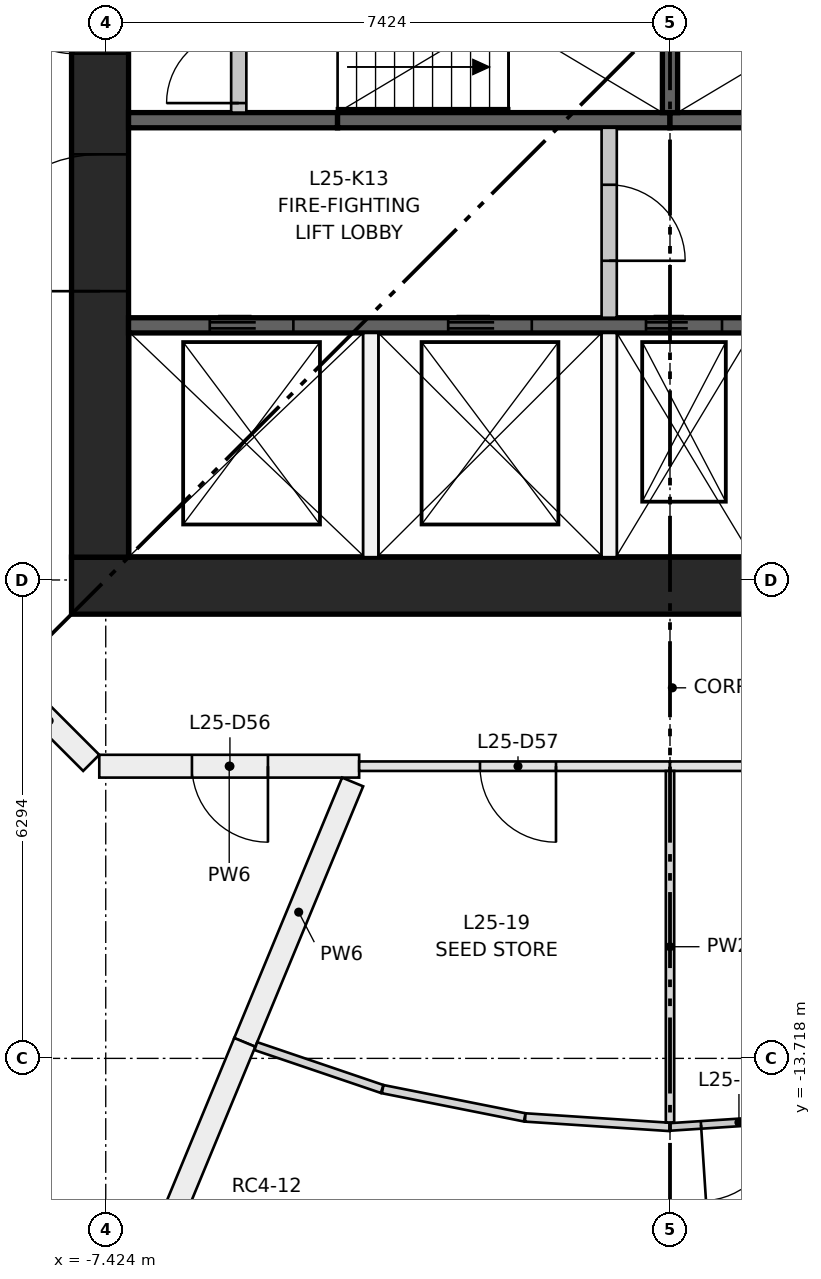
"""IFC4 building model, lengths in metres.
Left out: names, types, materials, properties, quantities, classifications, styles, units other than length and angle.
Written with IfcOpenShell. Run it as: python <this file> out.ifc"""

import sys

from ifc_helpers import new_model, si_unit, direction, frame, frame_2d, origin, place, context, subcontext, project, spatial, rectangle, extrude, element, fill, save


model = new_model("IFC4")
c1 = context("Model", 3, precision=1e-05, world=origin(), true_north=direction((0.0, 1.0)))
c2 = subcontext(c1, "Body", "Model", "MODEL_VIEW")
j1 = project(units=[si_unit("LENGTHUNIT", "METRE"), si_unit("PLANEANGLEUNIT", "RADIAN")], contexts=[c1])
p1 = place(None, origin())
s1 = spatial("IfcSite", under=j1, at=p1, CompositionType="ELEMENT")
p2 = place(p1, origin())
s2 = spatial("IfcBuilding", under=s1, at=p2, CompositionType="ELEMENT")
p3 = place(p2, frame((0.0, 0.0, 98.3)))
s3 = spatial("IfcBuildingStorey", under=s2, at=p3, CompositionType="ELEMENT", Elevation=98.3)
p4 = place(p3, frame((-7.874, -7.499, 0.0), z_axis=(0.0, 0.0, 1.0), x_axis=(1.0, 0.0, 0.0)))
e1 = element("IfcWall", 1, at=p4, inside=s3, PredefinedType="SHEAR", context=c2, shape_type="SweptSolid", body=[
    extrude(rectangle(XDim=15.748, YDim=0.75, at=frame_2d((7.874, 0.0))), origin(), (0.0, 0.0, 1.0), 3.65),
])
p5 = place(p3, frame((-7.499, -7.124, 0.0), z_axis=(0.0, 0.0, 1.0), x_axis=(0.0, 1.0, 0.0)))
e2 = element("IfcWall", 2, at=p5, inside=s3, PredefinedType="SHEAR", context=c2, shape_type="SweptSolid", body=[
    extrude(rectangle(XDim=14.248, YDim=0.75, at=frame_2d((7.124, 0.0))), origin(), (0.0, 0.0, 1.0), 3.65),
])
p6 = place(p5, frame((6.624, 0.0, 0.0)))
e3 = element("IfcOpeningElement", 3, at=p6, cuts=e2, PredefinedType="OPENING", context=c2, shape_type="SweptSolid", body=[
    extrude(rectangle(XDim=1.0, YDim=2.1, at=frame_2d((0.5, 1.05))), frame((0.0, 0.385, 0.0), z_axis=(0.0, -1.0, 0.0), x_axis=(1.0, 0.0, 0.0)), (0.0, 0.0, 1.0), 0.77),
])
p7 = place(p5, frame((3.5, 0.0, 0.0)))
e4 = element("IfcOpeningElement", 4, at=p7, cuts=e2, PredefinedType="OPENING", context=c2, shape_type="SweptSolid", body=[
    extrude(rectangle(XDim=1.8, YDim=2.1, at=frame_2d((0.9, 1.05))), frame((0.0, 0.385, 0.0), z_axis=(0.0, -1.0, 0.0), x_axis=(1.0, 0.0, 0.0)), (0.0, 0.0, 1.0), 0.77),
])
p8 = place(p5, frame((8.948, 0.0, 0.0)))
e5 = element("IfcOpeningElement", 5, at=p8, cuts=e2, PredefinedType="OPENING", context=c2, shape_type="SweptSolid", body=[
    extrude(rectangle(XDim=1.8, YDim=2.1, at=frame_2d((0.9, 1.05))), frame((0.0, 0.385, 0.0), z_axis=(0.0, -1.0, 0.0), x_axis=(1.0, 0.0, 0.0)), (0.0, 0.0, 1.0), 0.77),
])
p9 = place(p5, frame((12.124, 0.0, 0.0)))
e6 = element("IfcOpeningElement", 6, at=p9, cuts=e2, PredefinedType="OPENING", context=c2, shape_type="SweptSolid", body=[
    extrude(rectangle(XDim=1.0, YDim=2.1, at=frame_2d((0.5, 1.05))), frame((0.0, 0.385, 0.0), z_axis=(0.0, -1.0, 0.0), x_axis=(1.0, 0.0, 0.0)), (0.0, 0.0, 1.0), 0.77),
])
p10 = place(p3, frame((-7.124, -4.074, 0.0), z_axis=(0.0, 0.0, 1.0), x_axis=(1.0, 0.0, 0.0)))
e7 = element("IfcWall", 7, at=p10, inside=s3, PredefinedType="SHEAR", context=c2, shape_type="SweptSolid", body=[
    extrude(rectangle(XDim=14.248, YDim=0.2, at=frame_2d((7.124, 0.0))), origin(), (0.0, 0.0, 1.0), 3.3),
])
p11 = place(p10, frame((1.069, 0.0, 0.0)))
e8 = element("IfcOpeningElement", 8, at=p11, cuts=e7, PredefinedType="OPENING", context=c2, shape_type="SweptSolid", body=[
    extrude(rectangle(XDim=1.1, YDim=2.1, at=frame_2d((0.55, 1.05))), frame((0.0, 0.11, 0.0), z_axis=(0.0, -1.0, 0.0), x_axis=(1.0, 0.0, 0.0)), (0.0, 0.0, 1.0), 0.22),
])
p12 = place(p10, frame((4.206, 0.0, 0.0)))
e9 = element("IfcOpeningElement", 9, at=p12, cuts=e7, PredefinedType="OPENING", context=c2, shape_type="SweptSolid", body=[
    extrude(rectangle(XDim=1.1, YDim=2.1, at=frame_2d((0.55, 1.05))), frame((0.0, 0.11, 0.0), z_axis=(0.0, -1.0, 0.0), x_axis=(1.0, 0.0, 0.0)), (0.0, 0.0, 1.0), 0.22),
])
p13 = place(p10, frame((6.808, 0.0, 0.0)))
e10 = element("IfcOpeningElement", 10, at=p13, cuts=e7, PredefinedType="OPENING", context=c2, shape_type="SweptSolid", body=[
    extrude(rectangle(XDim=1.0, YDim=2.1, at=frame_2d((0.5, 1.05))), frame((0.0, 0.11, 0.0), z_axis=(0.0, -1.0, 0.0), x_axis=(1.0, 0.0, 0.0)), (0.0, 0.0, 1.0), 0.22),
])
p14 = place(p10, frame((8.777, 0.0, 0.0)))
e11 = element("IfcOpeningElement", 11, at=p14, cuts=e7, PredefinedType="OPENING", context=c2, shape_type="SweptSolid", body=[
    extrude(rectangle(XDim=1.0, YDim=2.1, at=frame_2d((0.5, 1.05))), frame((0.0, 0.11, 0.0), z_axis=(0.0, -1.0, 0.0), x_axis=(1.0, 0.0, 0.0)), (0.0, 0.0, 1.0), 0.22),
])
p15 = place(p10, frame((10.745, 0.0, 0.0)))
e12 = element("IfcOpeningElement", 12, at=p15, cuts=e7, PredefinedType="OPENING", context=c2, shape_type="SweptSolid", body=[
    extrude(rectangle(XDim=1.0, YDim=2.1, at=frame_2d((0.5, 1.05))), frame((0.0, 0.11, 0.0), z_axis=(0.0, -1.0, 0.0), x_axis=(1.0, 0.0, 0.0)), (0.0, 0.0, 1.0), 0.22),
])
p16 = place(p10, frame((12.714, 0.0, 0.0)))
e13 = element("IfcOpeningElement", 13, at=p16, cuts=e7, PredefinedType="OPENING", context=c2, shape_type="SweptSolid", body=[
    extrude(rectangle(XDim=1.0, YDim=2.1, at=frame_2d((0.5, 1.05))), frame((0.0, 0.11, 0.0), z_axis=(0.0, -1.0, 0.0), x_axis=(1.0, 0.0, 0.0)), (0.0, 0.0, 1.0), 0.22),
])
p17 = place(p3, frame((-7.124, -1.375, 0.0), z_axis=(0.0, 0.0, 1.0), x_axis=(1.0, 0.0, 0.0)))
e14 = element("IfcWall", 14, at=p17, inside=s3, PredefinedType="SHEAR", context=c2, shape_type="SweptSolid", body=[
    extrude(rectangle(XDim=2.75, YDim=0.2, at=frame_2d((1.375, 0.0))), origin(), (0.0, 0.0, 1.0), 3.3),
])
for number, where, z_axis, x_axis in (
    (15, (-4.374, -1.375, 0.0), (0.0, 0.0, 1.0), (1.0, 0.0, 0.0)),
    (16, (0.0, -1.375, 0.0), (0.0, 0.0, 1.0), (1.0, 0.0, 0.0)),
):
    element("IfcWall", number, at=place(p3, frame(where, z_axis=z_axis, x_axis=x_axis)), inside=s3, PredefinedType="SHEAR", context=c2, shape_type="SweptSolid", body=[
        extrude(rectangle(XDim=4.374, YDim=0.2, at=frame_2d((2.187, 0.0))), origin(), (0.0, 0.0, 1.0), 3.3),
    ])
p18 = place(p3, frame((0.0, -1.275, 0.0), z_axis=(0.0, 0.0, 1.0), x_axis=(0.0, 1.0, 0.0)))
e17 = element("IfcWall", 17, at=p18, inside=s3, PredefinedType="SHEAR", context=c2, shape_type="SweptSolid", body=[
    extrude(rectangle(XDim=2.55, YDim=0.2, at=frame_2d((1.275, 0.0))), origin(), (0.0, 0.0, 1.0), 3.3),
])
for number, where, z_axis, x_axis in (
    (18, (-3.937, -7.124, 0.0), (0.0, 0.0, 1.0), (0.0, 1.0, 0.0)),
    (19, (-0.8, -7.124, 0.0), (0.0, 0.0, 1.0), (0.0, 1.0, 0.0)),
):
    element("IfcWall", number, at=place(p3, frame(where, z_axis=z_axis, x_axis=x_axis)), inside=s3, PredefinedType="PARTITIONING", context=c2, shape_type="SweptSolid", body=[
        extrude(rectangle(XDim=2.95, YDim=0.2, at=frame_2d((1.475, 0.0))), origin(), (0.0, 0.0, 1.0), 3.3),
    ])
p19 = place(p3, frame((-0.8, -3.974, 0.0), z_axis=(0.0, 0.0, 1.0), x_axis=(0.0, 1.0, 0.0)))
e20 = element("IfcWall", 20, at=p19, inside=s3, PredefinedType="PARTITIONING", context=c2, shape_type="SweptSolid", body=[
    extrude(rectangle(XDim=2.499, YDim=0.2, at=frame_2d((1.25, 0.0))), origin(), (0.0, 0.0, 1.0), 3.3),
])
p20 = place(p19, frame((0.75, 0.0, 0.0)))
e21 = element("IfcOpeningElement", 21, at=p20, cuts=e20, PredefinedType="OPENING", context=c2, shape_type="SweptSolid", body=[
    extrude(rectangle(XDim=1.0, YDim=2.1, at=frame_2d((0.5, 1.05))), frame((0.0, 0.11, 0.0), z_axis=(0.0, -1.0, 0.0), x_axis=(1.0, 0.0, 0.0)), (0.0, 0.0, 1.0), 0.22),
])
p21 = place(p3, frame((-5.674, -1.275, 0.0), z_axis=(0.0, 0.0, 1.0), x_axis=(0.0, 1.0, 0.0)))
e22 = element("IfcWall", 22, at=p21, inside=s3, PredefinedType="PARTITIONING", context=c2, shape_type="SweptSolid", body=[
    extrude(rectangle(XDim=2.55, YDim=0.2, at=frame_2d((1.275, 0.0))), origin(), (0.0, 0.0, 1.0), 3.3),
])
p22 = place(p21, frame((0.125, 0.0, 0.0)))
e23 = element("IfcOpeningElement", 23, at=p22, cuts=e22, PredefinedType="OPENING", context=c2, shape_type="SweptSolid", body=[
    extrude(rectangle(XDim=0.95, YDim=2.1, at=frame_2d((0.475, 1.05))), frame((0.0, 0.11, 0.0), z_axis=(0.0, -1.0, 0.0), x_axis=(1.0, 0.0, 0.0)), (0.0, 0.0, 1.0), 0.22),
])
p23 = place(p21, frame((1.475, 0.0, 0.0)))
e24 = element("IfcOpeningElement", 24, at=p23, cuts=e22, PredefinedType="OPENING", context=c2, shape_type="SweptSolid", body=[
    extrude(rectangle(XDim=0.95, YDim=2.1, at=frame_2d((0.475, 1.05))), frame((0.0, 0.11, 0.0), z_axis=(0.0, -1.0, 0.0), x_axis=(1.0, 0.0, 0.0)), (0.0, 0.0, 1.0), 0.22),
])
p24 = place(p3, frame((-7.615, -9.83, 0.0), z_axis=(0.0, 0.0, 1.0), x_axis=(-0.707028841614, 0.70718471217, 0.0)))
e25 = element("IfcWall", 25, at=p24, inside=s3, PredefinedType="PARTITIONING", context=c2, shape_type="SweptSolid", body=[
    extrude(rectangle(XDim=1.566, YDim=0.3, at=frame_2d((0.783, 0.0))), origin(), (0.0, 0.0, 1.0), 3.3),
])
p25 = place(p3, frame((-4.09, -9.874, 0.0), z_axis=(0.0, 0.0, 1.0), x_axis=(-1.0, 0.0, 0.0)))
e26 = element("IfcWall", 26, at=p25, inside=s3, PredefinedType="PARTITIONING", context=c2, shape_type="SweptSolid", body=[
    extrude(rectangle(XDim=3.419, YDim=0.3, at=frame_2d((1.709, 0.0))), origin(), (0.0, 0.0, 1.0), 3.3),
])
p26 = place(p25, frame((1.2, 0.0, 0.0)))
e27 = element("IfcOpeningElement", 27, at=p26, cuts=e26, PredefinedType="OPENING", context=c2, shape_type="SweptSolid", body=[
    extrude(rectangle(XDim=1.0, YDim=2.1, at=frame_2d((0.5, 1.05))), frame((0.0, 0.16, 0.0), z_axis=(0.0, -1.0, 0.0), x_axis=(1.0, 0.0, 0.0)), (0.0, 0.0, 1.0), 0.32),
])
p27 = place(p3, frame((0.0, -9.874, 0.0), z_axis=(0.0, 0.0, 1.0), x_axis=(-1.0, 0.0, 0.0)))
e28 = element("IfcWall", 28, at=p27, inside=s3, PredefinedType="PARTITIONING", context=c2, shape_type="SweptSolid", body=[
    extrude(rectangle(XDim=4.09, YDim=0.125, at=frame_2d((2.045, 0.0))), origin(), (0.0, 0.0, 1.0), 3.3),
])
p28 = place(p27, frame((1.5, 0.0, 0.0)))
e29 = element("IfcOpeningElement", 29, at=p28, cuts=e28, PredefinedType="OPENING", context=c2, shape_type="SweptSolid", body=[
    extrude(rectangle(XDim=1.0, YDim=2.1, at=frame_2d((0.5, 1.05))), frame((0.0, 0.073, 0.0), z_axis=(0.0, -1.0, 0.0), x_axis=(1.0, 0.0, 0.0)), (0.0, 0.0, 1.0), 0.145),
])
p29 = place(p3, frame((4.09, -9.874, 0.0), z_axis=(0.0, 0.0, 1.0), x_axis=(-1.0, 0.0, 0.0)))
e30 = element("IfcWall", 30, at=p29, inside=s3, PredefinedType="PARTITIONING", context=c2, shape_type="SweptSolid", body=[
    extrude(rectangle(XDim=4.09, YDim=0.125, at=frame_2d((2.045, 0.0))), origin(), (0.0, 0.0, 1.0), 3.3),
])
p30 = place(p29, frame((1.5, 0.0, 0.0)))
e31 = element("IfcOpeningElement", 31, at=p30, cuts=e30, PredefinedType="OPENING", context=c2, shape_type="SweptSolid", body=[
    extrude(rectangle(XDim=1.0, YDim=2.1, at=frame_2d((0.5, 1.05))), frame((0.0, 0.073, 0.0), z_axis=(0.0, -1.0, 0.0), x_axis=(1.0, 0.0, 0.0)), (0.0, 0.0, 1.0), 0.145),
])
p31 = place(p3, frame((-4.176, -10.081, 0.0), z_axis=(0.0, 0.0, 1.0), x_axis=(-0.382669680004, -0.923885228806, 0.0)))
e32 = element("IfcWall", 32, at=p31, inside=s3, PredefinedType="PARTITIONING", context=c2, shape_type="SweptSolid", body=[
    extrude(rectangle(XDim=3.708, YDim=0.3, at=frame_2d((1.854, 0.0))), origin(), (0.0, 0.0, 1.0), 3.3),
])
p32 = place(p3, frame((-5.595, -13.507, 0.0), z_axis=(0.0, 0.0, 1.0), x_axis=(-0.382681133009, -0.923880484932, 0.0)))
e33 = element("IfcWall", 33, at=p32, inside=s3, PredefinedType="PARTITIONING", context=c2, shape_type="SweptSolid", body=[
    extrude(rectangle(XDim=3.47, YDim=0.3, at=frame_2d((1.735, 0.0))), origin(), (0.0, 0.0, 1.0), 3.3),
])
p33 = place(p3, frame((-3.787, -14.121, 0.0), z_axis=(0.0, 0.0, 1.0), x_axis=(-0.946943921292, 0.321398833116, 0.0)))
e34 = element("IfcWall", 34, at=p33, inside=s3, PredefinedType="PARTITIONING", context=c2, shape_type="SweptSolid", body=[
    extrude(rectangle(XDim=1.755, YDim=0.11, at=frame_2d((0.877, 0.0))), origin(), (0.0, 0.0, 1.0), 3.3),
])
p34 = place(p3, frame((-1.912, -14.494, 0.0), z_axis=(0.0, 0.0, 1.0), x_axis=(-0.980796931486, 0.195031738924, 0.0)))
e35 = element("IfcWall", 35, at=p34, inside=s3, PredefinedType="PARTITIONING", context=c2, shape_type="SweptSolid", body=[
    extrude(rectangle(XDim=1.905, YDim=0.11, at=frame_2d((0.953, 0.0))), origin(), (0.0, 0.0, 1.0), 3.3),
])
p35 = place(p3, frame((0.0, -14.62, 0.0), z_axis=(0.0, 0.0, 1.0), x_axis=(-0.997853662235, 0.065483347227, 0.0)))
e36 = element("IfcWall", 36, at=p35, inside=s3, PredefinedType="PARTITIONING", context=c2, shape_type="SweptSolid", body=[
    extrude(rectangle(XDim=1.909, YDim=0.11, at=frame_2d((0.955, 0.0))), origin(), (0.0, 0.0, 1.0), 3.3),
])
p36 = place(p3, frame((0.0, -9.937, 0.0), z_axis=(0.0, 0.0, 1.0), x_axis=(0.0, -1.0, 0.0)))
e37 = element("IfcWall", 37, at=p36, inside=s3, PredefinedType="PARTITIONING", context=c2, shape_type="SweptSolid", body=[
    extrude(rectangle(XDim=4.625, YDim=0.11, at=frame_2d((2.312, 0.0))), origin(), (0.0, 0.0, 1.0), 3.3),
])
p37 = place(p3, frame((1.905, -14.495, 0.0), z_axis=(0.0, 0.0, 1.0), x_axis=(-0.997854210562, -0.065474991133, 0.0)))
e38 = element("IfcWall", 38, at=p37, inside=s3, PredefinedType="PARTITIONING", context=c2, shape_type="SweptSolid", body=[
    extrude(rectangle(XDim=1.909, YDim=0.1, at=frame_2d((0.955, 0.0))), origin(), (0.0, 0.0, 1.0), 3.3),
])
p38 = place(p37, frame((0.5, 0.0, 0.0)))
e39 = element("IfcOpeningElement", 39, at=p38, cuts=e38, PredefinedType="OPENING", context=c2, shape_type="SweptSolid", body=[
    extrude(rectangle(XDim=1.0, YDim=2.1, at=frame_2d((0.5, 1.05))), frame((0.0, 0.06, 0.0), z_axis=(0.0, -1.0, 0.0), x_axis=(1.0, 0.0, 0.0)), (0.0, 0.0, 1.0), 0.12),
])
p39 = place(p11, origin())
e40 = element("IfcDoor", 40, at=p39, inside=s3, OperationType="DOUBLE_DOOR_SLIDING", PredefinedType="DOOR", context=c2, shape_type="SweptSolid", body=[
    extrude(rectangle(XDim=1.1, YDim=2.1, at=frame_2d((0.55, 1.05))), frame((0.0, 0.025, 0.0), z_axis=(0.0, -1.0, 0.0), x_axis=(1.0, 0.0, 0.0)), (0.0, 0.0, 1.0), 0.05),
])
fill(e8, e40)
p40 = place(p12, origin())
e41 = element("IfcDoor", 41, at=p40, inside=s3, OperationType="DOUBLE_DOOR_SLIDING", PredefinedType="DOOR", context=c2, shape_type="SweptSolid", body=[
    extrude(rectangle(XDim=1.1, YDim=2.1, at=frame_2d((0.55, 1.05))), frame((0.0, 0.025, 0.0), z_axis=(0.0, -1.0, 0.0), x_axis=(1.0, 0.0, 0.0)), (0.0, 0.0, 1.0), 0.05),
])
fill(e9, e41)
p41 = place(p13, origin())
e42 = element("IfcDoor", 42, at=p41, inside=s3, OperationType="DOUBLE_DOOR_SLIDING", PredefinedType="DOOR", context=c2, shape_type="SweptSolid", body=[
    extrude(rectangle(XDim=1.0, YDim=2.1, at=frame_2d((0.5, 1.05))), frame((0.0, 0.025, 0.0), z_axis=(0.0, -1.0, 0.0), x_axis=(1.0, 0.0, 0.0)), (0.0, 0.0, 1.0), 0.05),
])
fill(e10, e42)
p42 = place(p22, origin())
e43 = element("IfcDoor", 43, at=p42, inside=s3, OperationType="SINGLE_SWING_LEFT", PredefinedType="DOOR", context=c2, shape_type="SweptSolid", body=[
    extrude(rectangle(XDim=0.95, YDim=2.1, at=frame_2d((0.475, 1.05))), frame((0.0, 0.025, 0.0), z_axis=(0.0, -1.0, 0.0), x_axis=(1.0, 0.0, 0.0)), (0.0, 0.0, 1.0), 0.05),
])
fill(e23, e43)
p43 = place(p20, frame((1.0, 0.0, 0.0), z_axis=(0.0, 0.0, 1.0), x_axis=(-1.0, 0.0, 0.0)))
e44 = element("IfcDoor", 44, at=p43, inside=s3, OperationType="SINGLE_SWING_LEFT", PredefinedType="DOOR", context=c2, shape_type="SweptSolid", body=[
    extrude(rectangle(XDim=1.0, YDim=2.1, at=frame_2d((0.5, 1.05))), frame((0.0, 0.025, 0.0), z_axis=(0.0, -1.0, 0.0), x_axis=(1.0, 0.0, 0.0)), (0.0, 0.0, 1.0), 0.05),
])
fill(e21, e44)
p44 = place(p6, origin())
e45 = element("IfcDoor", 45, at=p44, inside=s3, OperationType="SINGLE_SWING_RIGHT", PredefinedType="DOOR", context=c2, shape_type="SweptSolid", body=[
    extrude(rectangle(XDim=1.0, YDim=2.1, at=frame_2d((0.5, 1.05))), frame((0.0, 0.375, 0.0), z_axis=(0.0, -1.0, 0.0), x_axis=(1.0, 0.0, 0.0)), (0.0, 0.0, 1.0), 0.05),
])
fill(e3, e45)
p45 = place(p7, origin())
e46 = element("IfcDoor", 46, at=p45, inside=s3, OperationType="DOUBLE_DOOR_SINGLE_SWING", PredefinedType="DOOR", context=c2, shape_type="SweptSolid", body=[
    extrude(rectangle(XDim=1.8, YDim=2.1, at=frame_2d((0.9, 1.05))), frame((0.0, 0.025, 0.0), z_axis=(0.0, -1.0, 0.0), x_axis=(1.0, 0.0, 0.0)), (0.0, 0.0, 1.0), 0.05),
])
fill(e4, e46)
p46 = place(p26, origin())
e47 = element("IfcDoor", 47, at=p46, inside=s3, OperationType="SINGLE_SWING_LEFT", PredefinedType="DOOR", context=c2, shape_type="SweptSolid", body=[
    extrude(rectangle(XDim=1.0, YDim=2.1, at=frame_2d((0.5, 1.05))), frame((0.0, 0.025, 0.0), z_axis=(0.0, -1.0, 0.0), x_axis=(1.0, 0.0, 0.0)), (0.0, 0.0, 1.0), 0.05),
])
fill(e27, e47)
p47 = place(p28, origin())
e48 = element("IfcDoor", 48, at=p47, inside=s3, OperationType="SINGLE_SWING_LEFT", PredefinedType="DOOR", context=c2, shape_type="SweptSolid", body=[
    extrude(rectangle(XDim=1.0, YDim=2.1, at=frame_2d((0.5, 1.05))), frame((0.0, 0.025, 0.0), z_axis=(0.0, -1.0, 0.0), x_axis=(1.0, 0.0, 0.0)), (0.0, 0.0, 1.0), 0.05),
])
fill(e29, e48)
p48 = place(p38, origin())
e49 = element("IfcDoor", 49, at=p48, inside=s3, OperationType="SINGLE_SWING_RIGHT", PredefinedType="DOOR", context=c2, shape_type="SweptSolid", body=[
    extrude(rectangle(XDim=1.0, YDim=2.1, at=frame_2d((0.5, 1.05))), frame((0.0, 0.025, 0.0), z_axis=(0.0, -1.0, 0.0), x_axis=(1.0, 0.0, 0.0)), (0.0, 0.0, 1.0), 0.05),
])
fill(e39, e49)
save(model, sys.argv[1])
